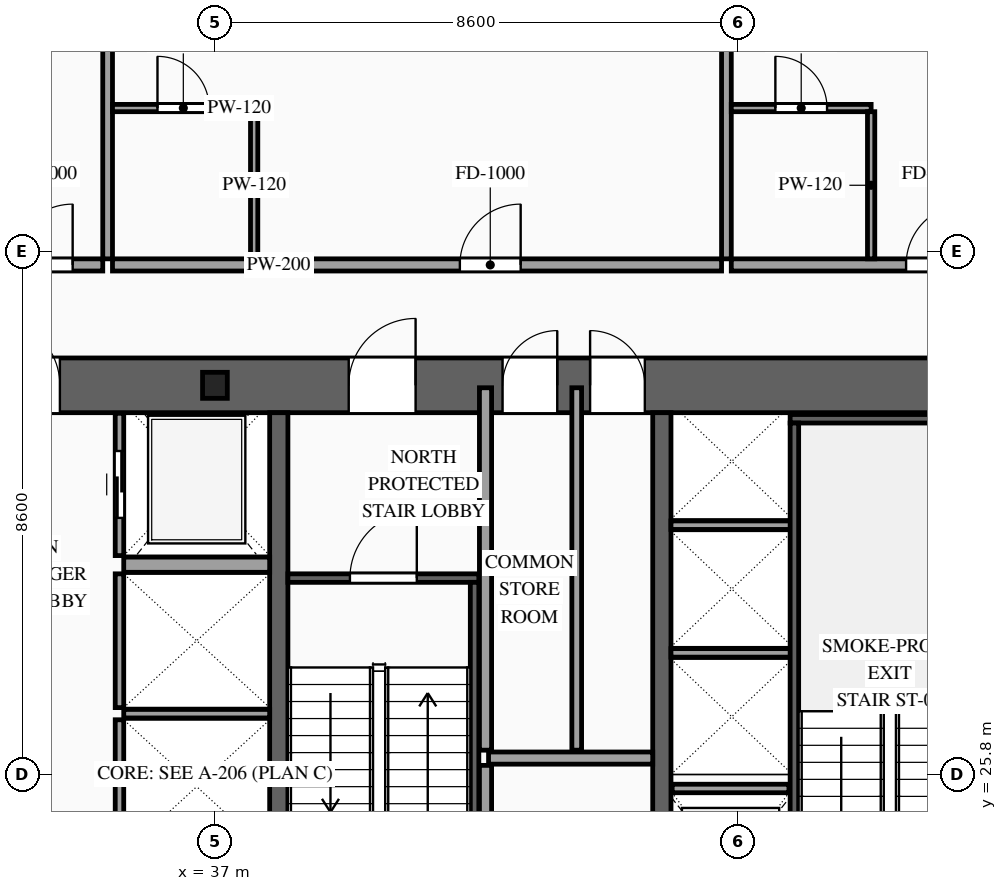
"""IFC4 building model, lengths in metres.
Left out: names, types, materials, properties, quantities, classifications, styles, units other than length and angle.
Written with IfcOpenShell. Run it as: python <this file> out.ifc"""

import sys

from ifc_helpers import new_model, si_unit, direction, frame, frame_2d, origin, origin_2d, place, context, subcontext, project, spatial, rectangle, i_section, extrude, source, transform, mapped, element, fill, save


model = new_model("IFC4")
c1 = context("Model", 3, precision=1e-05, world=origin(), true_north=direction((0.0, 1.0)))
c2 = subcontext(c1, "Body", "Model", "MODEL_VIEW")
j1 = project(units=[si_unit("LENGTHUNIT", "METRE"), si_unit("PLANEANGLEUNIT", "RADIAN")], contexts=[c1])
p1 = place(None, origin())
s1 = spatial("IfcSite", under=j1, at=p1, CompositionType="ELEMENT")
p2 = place(p1, origin())
s2 = spatial("IfcBuilding", under=s1, at=p2, CompositionType="ELEMENT")
p3 = place(p2, frame((0.0, 0.0, 74.8)))
s3 = spatial("IfcBuildingStorey", under=s2, at=p3, CompositionType="ELEMENT", Elevation=74.8)
p4 = place(p3, frame((23.35, 32.2, 0.0), z_axis=(0.0, 0.0, 1.0), x_axis=(1.0, 0.0, 0.0)))
e1 = element("IfcWall", 1, at=p4, inside=s3, PredefinedType="SHEAR", context=c2, shape_type="SweptSolid", body=[
    extrude(rectangle(XDim=27.3, YDim=0.9, at=frame_2d((13.65, 0.0))), origin(), (0.0, 0.0, 1.0), 3.6),
])
p5 = place(p4, frame((4.72, 0.0, 0.0)))
e2 = element("IfcOpeningElement", 2, at=p5, cuts=e1, PredefinedType="OPENING", context=c2, shape_type="SweptSolid", body=[
    extrude(rectangle(XDim=0.9, YDim=2.15, at=frame_2d((0.45, 1.075))), frame((0.0, 0.465, 0.0), z_axis=(0.0, -1.0, 0.0), x_axis=(1.0, 0.0, 0.0)), (0.0, 0.0, 1.0), 0.93),
])
p6 = place(p4, frame((10.0, 0.0, 0.0)))
e3 = element("IfcOpeningElement", 3, at=p6, cuts=e1, PredefinedType="OPENING", context=c2, shape_type="SweptSolid", body=[
    extrude(rectangle(XDim=1.1, YDim=2.2, at=frame_2d((0.55, 1.1))), frame((0.0, 0.465, 0.0), z_axis=(0.0, -1.0, 0.0), x_axis=(1.0, 0.0, 0.0)), (0.0, 0.0, 1.0), 0.93),
])
p7 = place(p4, frame((15.85, 0.0, 0.0)))
e4 = element("IfcOpeningElement", 4, at=p7, cuts=e1, PredefinedType="OPENING", context=c2, shape_type="SweptSolid", body=[
    extrude(rectangle(XDim=1.1, YDim=2.2, at=frame_2d((0.55, 1.1))), frame((0.0, 0.465, 0.0), z_axis=(0.0, -1.0, 0.0), x_axis=(1.0, 0.0, 0.0)), (0.0, 0.0, 1.0), 0.93),
])
p8 = place(p4, frame((18.38, 0.0, 0.0)))
e5 = element("IfcOpeningElement", 5, at=p8, cuts=e1, PredefinedType="OPENING", context=c2, shape_type="SweptSolid", body=[
    extrude(rectangle(XDim=0.9, YDim=2.15, at=frame_2d((0.45, 1.075))), frame((0.0, 0.465, 0.0), z_axis=(0.0, -1.0, 0.0), x_axis=(1.0, 0.0, 0.0)), (0.0, 0.0, 1.0), 0.93),
])
p9 = place(p4, frame((19.82, 0.0, 0.0)))
e6 = element("IfcOpeningElement", 6, at=p9, cuts=e1, PredefinedType="OPENING", context=c2, shape_type="SweptSolid", body=[
    extrude(rectangle(XDim=0.9, YDim=2.15, at=frame_2d((0.45, 1.075))), frame((0.0, 0.465, 0.0), z_axis=(0.0, -1.0, 0.0), x_axis=(1.0, 0.0, 0.0)), (0.0, 0.0, 1.0), 0.93),
])
m1 = source(origin(), c2, "Body", "SweptSolid", [
    extrude(rectangle(XDim=11.9, YDim=0.3, at=frame_2d((5.95, 0.0))), origin(), (0.0, 0.0, 1.0), 3.6),
])
for number, where, z_axis, x_axis in (
    (7, (38.05, 19.85, 0.0), (0.0, 0.0, 1.0), (0.0, 1.0, 0.0)),
    (8, (44.35, 19.85, 0.0), (0.0, 0.0, 1.0), (0.0, 1.0, 0.0)),
):
    element("IfcWall", number, at=place(p3, frame(where, z_axis=z_axis, x_axis=x_axis)), inside=s3, PredefinedType="SOLIDWALL", context=c2, shape_type="MappedRepresentation", body=[
        mapped(m1, transform((0.0, 0.0, 0.0), scale=1.0)),
    ])
m2 = source(origin(), c2, "Body", "SweptSolid", [
    extrude(i_section(OverallWidth=0.407, OverallDepth=0.428, WebThickness=0.02, FlangeThickness=0.035, at=origin_2d()), origin(), (0.0, 0.0, 1.0), 3.6),
])
p10 = place(p3, frame((37.0, 32.2, 0.0), z_axis=(0.0, 0.0, 1.0), x_axis=(1.0, 0.0, 0.0)))
e9 = element("IfcColumn", 9, at=p10, inside=s3, PredefinedType="COLUMN", context=c2, shape_type="MappedRepresentation", body=[
    mapped(m2, transform((0.0, 0.0, 0.0), scale=1.0)),
])
m3 = source(origin(), c2, "Body", "SweptSolid", [
    extrude(rectangle(XDim=1.92, YDim=0.14, at=frame_2d((0.96, 0.0))), origin(), (0.0, 0.0, 1.0), 3.38),
])
p11 = place(p3, frame((44.52, 25.57, 0.0), z_axis=(0.0, 0.0, 1.0), x_axis=(1.0, 0.0, 0.0)))
e10 = element("IfcWall", 10, at=p11, inside=s3, PredefinedType="SOLIDWALL", context=c2, shape_type="MappedRepresentation", body=[
    mapped(m3, transform((0.0, 0.0, 0.0), scale=1.0)),
])
m4 = source(origin(), c2, "Body", "SweptSolid", [
    extrude(rectangle(XDim=2.2, YDim=0.14, at=frame_2d((1.1, 0.0))), origin(), (0.0, 0.0, 1.0), 3.38),
])
p12 = place(p3, frame((35.43, 24.5, 0.0), z_axis=(0.0, 0.0, 1.0), x_axis=(0.0, 1.0, 0.0)))
e11 = element("IfcWall", 11, at=p12, inside=s3, PredefinedType="SOLIDWALL", context=c2, shape_type="MappedRepresentation", body=[
    mapped(m4, transform((0.0, 0.0, 0.0), scale=1.0)),
])
m5 = source(origin(), c2, "Body", "SweptSolid", [
    extrude(rectangle(XDim=2.4, YDim=0.14, at=frame_2d((1.2, 0.0))), origin(), (0.0, 0.0, 1.0), 3.38),
])
p13 = place(p3, frame((35.5, 26.8, 0.0), z_axis=(0.0, 0.0, 1.0), x_axis=(1.0, 0.0, 0.0)))
e12 = element("IfcWall", 12, at=p13, inside=s3, PredefinedType="SOLIDWALL", context=c2, shape_type="MappedRepresentation", body=[
    mapped(m5, transform((0.0, 0.0, 0.0), scale=1.0)),
])
m6 = source(origin(), c2, "Body", "SweptSolid", [
    extrude(rectangle(XDim=2.2, YDim=0.14, at=frame_2d((1.1, 0.0))), origin(), (0.0, 0.0, 1.0), 3.38),
])
p14 = place(p3, frame((35.43, 26.9, 0.0), z_axis=(0.0, 0.0, 1.0), x_axis=(0.0, 1.0, 0.0)))
e13 = element("IfcWall", 13, at=p14, inside=s3, PredefinedType="SOLIDWALL", context=c2, shape_type="MappedRepresentation", body=[
    mapped(m6, transform((0.0, 0.0, 0.0), scale=1.0)),
])
p15 = place(p3, frame((35.43, 29.4, 0.0), z_axis=(0.0, 0.0, 1.0), x_axis=(0.0, 1.0, 0.0)))
e14 = element("IfcWall", 14, at=p15, inside=s3, PredefinedType="SOLIDWALL", context=c2, shape_type="SweptSolid", body=[
    extrude(rectangle(XDim=2.34, YDim=0.14, at=frame_2d((1.17, 0.0))), origin(), (0.0, 0.0, 1.0), 3.38),
])
p16 = place(p15, frame((0.62, 0.0, 0.0)))
e15 = element("IfcOpeningElement", 15, at=p16, cuts=e14, PredefinedType="OPENING", context=c2, shape_type="SweptSolid", body=[
    extrude(rectangle(XDim=1.1, YDim=2.2, at=frame_2d((0.55, 1.1))), frame((0.0, 0.085, 0.0), z_axis=(0.0, -1.0, 0.0), x_axis=(1.0, 0.0, 0.0)), (0.0, 0.0, 1.0), 0.17),
])
m7 = source(origin(), c2, "Body", "SweptSolid", [
    extrude(rectangle(XDim=2.4, YDim=0.25, at=frame_2d((1.2, 0.0))), origin(), (0.0, 0.0, 1.0), 3.38),
])
p17 = place(p3, frame((35.5, 29.25, 0.0), z_axis=(0.0, 0.0, 1.0), x_axis=(1.0, 0.0, 0.0)))
e16 = element("IfcWall", 16, at=p17, inside=s3, PredefinedType="SOLIDWALL", context=c2, shape_type="MappedRepresentation", body=[
    mapped(m7, transform((0.0, 0.0, 0.0), scale=1.0)),
])
m8 = source(origin(), c2, "Body", "SweptSolid", [
    extrude(rectangle(XDim=2.0, YDim=0.14, at=frame_2d((1.0, 0.0))), origin(), (0.0, 0.0, 1.0), 3.38),
])
for number, where, z_axis, x_axis in (
    (17, (44.5, 27.8, 0.0), (0.0, 0.0, 1.0), (1.0, 0.0, 0.0)),
    (18, (44.5, 29.9, 0.0), (0.0, 0.0, 1.0), (1.0, 0.0, 0.0)),
):
    element("IfcWall", number, at=place(p3, frame(where, z_axis=z_axis, x_axis=x_axis)), inside=s3, PredefinedType="SOLIDWALL", context=c2, shape_type="MappedRepresentation", body=[
        mapped(m8, transform((0.0, 0.0, 0.0), scale=1.0)),
    ])
m9 = source(origin(), c2, "Body", "SweptSolid", [
    extrude(rectangle(XDim=3.28, YDim=0.14, at=frame_2d((1.64, 0.0))), origin(), (0.0, 0.0, 1.0), 3.38),
])
p18 = place(p3, frame((46.46, 31.65, 0.0), z_axis=(0.0, 0.0, 1.0), x_axis=(1.0, 0.0, 0.0)))
e19 = element("IfcWall", 19, at=p18, inside=s3, PredefinedType="SOLIDWALL", context=c2, shape_type="MappedRepresentation", body=[
    mapped(m9, transform((0.0, 0.0, 0.0), scale=1.0)),
])
m10 = source(origin(), c2, "Body", "SweptSolid", [
    extrude(rectangle(XDim=8.94, YDim=0.14, at=frame_2d((4.47, 0.0))), origin(), (0.0, 0.0, 1.0), 3.38),
])
p19 = place(p3, frame((46.53, 22.64, 0.0), z_axis=(0.0, 0.0, 1.0), x_axis=(0.0, 1.0, 0.0)))
e20 = element("IfcWall", 20, at=p19, inside=s3, PredefinedType="SOLIDWALL", context=c2, shape_type="MappedRepresentation", body=[
    mapped(m10, transform((0.0, 0.0, 0.0), scale=1.0)),
])
p20 = place(p3, frame((38.2, 29.03, 0.0), z_axis=(0.0, 0.0, 1.0), x_axis=(1.0, 0.0, 0.0)))
e21 = element("IfcWall", 21, at=p20, inside=s3, PredefinedType="SOLIDWALL", context=c2, shape_type="SweptSolid", body=[
    extrude(rectangle(XDim=3.14, YDim=0.14, at=frame_2d((1.57, 0.0))), origin(), (0.0, 0.0, 1.0), 3.38),
])
p21 = place(p20, frame((1.02, 0.0, 0.0)))
e22 = element("IfcOpeningElement", 22, at=p21, cuts=e21, PredefinedType="OPENING", context=c2, shape_type="SweptSolid", body=[
    extrude(rectangle(XDim=1.1, YDim=2.2, at=frame_2d((0.55, 1.1))), frame((0.0, 0.085, 0.0), z_axis=(0.0, -1.0, 0.0), x_axis=(1.0, 0.0, 0.0)), (0.0, 0.0, 1.0), 0.17),
])
m11 = source(origin(), c2, "Body", "SweptSolid", [
    extrude(rectangle(XDim=8.94, YDim=0.14, at=frame_2d((4.47, 0.0))), origin(), (0.0, 0.0, 1.0), 3.38),
])
p22 = place(p3, frame((41.27, 20.02, 0.0), z_axis=(0.0, 0.0, 1.0), x_axis=(0.0, 1.0, 0.0)))
e23 = element("IfcWall", 23, at=p22, inside=s3, PredefinedType="SOLIDWALL", context=c2, shape_type="MappedRepresentation", body=[
    mapped(m11, transform((0.0, 0.0, 0.0), scale=1.0)),
])
m12 = source(origin(), c2, "Body", "SweptSolid", [
    extrude(rectangle(XDim=6.51, YDim=0.2, at=frame_2d((3.255, 0.0))), origin(), (0.0, 0.0, 1.0), 3.38),
])
p23 = place(p3, frame((41.45, 19.44, 0.0), z_axis=(0.0, 0.0, 1.0), x_axis=(0.0, 1.0, 0.0)))
e24 = element("IfcWall", 24, at=p23, inside=s3, PredefinedType="PARTITIONING", context=c2, shape_type="MappedRepresentation", body=[
    mapped(m12, transform((0.0, 0.0, 0.0), scale=1.0)),
])
m13 = source(origin(), c2, "Body", "SweptSolid", [
    extrude(rectangle(XDim=2.7, YDim=0.2, at=frame_2d((1.35, 0.0))), origin(), (0.0, 0.0, 1.0), 3.38),
])
p24 = place(p3, frame((41.5, 26.07, 0.0), z_axis=(0.0, 0.0, 1.0), x_axis=(1.0, 0.0, 0.0)))
e25 = element("IfcWall", 25, at=p24, inside=s3, PredefinedType="PARTITIONING", context=c2, shape_type="MappedRepresentation", body=[
    mapped(m13, transform((0.0, 0.0, 0.0), scale=1.0)),
])
m14 = source(origin(), c2, "Body", "SweptSolid", [
    extrude(rectangle(XDim=5.96, YDim=0.2, at=frame_2d((2.98, 0.0))), origin(), (0.0, 0.0, 1.0), 3.38),
])
p25 = place(p3, frame((41.45, 26.2, 0.0), z_axis=(0.0, 0.0, 1.0), x_axis=(0.0, 1.0, 0.0)))
e26 = element("IfcWall", 26, at=p25, inside=s3, PredefinedType="PARTITIONING", context=c2, shape_type="MappedRepresentation", body=[
    mapped(m14, transform((0.0, 0.0, 0.0), scale=1.0)),
])
m15 = source(origin(), c2, "Body", "SweptSolid", [
    extrude(rectangle(XDim=5.96, YDim=0.16, at=frame_2d((2.98, 0.0))), origin(), (0.0, 0.0, 1.0), 3.38),
])
p26 = place(p3, frame((42.95, 26.2, 0.0), z_axis=(0.0, 0.0, 1.0), x_axis=(0.0, 1.0, 0.0)))
e27 = element("IfcWall", 27, at=p26, inside=s3, PredefinedType="PARTITIONING", context=c2, shape_type="MappedRepresentation", body=[
    mapped(m15, transform((0.0, 0.0, 0.0), scale=1.0)),
])
p27 = place(p3, frame((30.786, 34.18, 0.0), z_axis=(0.0, 0.0, 1.0), x_axis=(1.0, 0.0, 0.0)))
e28 = element("IfcWall", 28, at=p27, inside=s3, PredefinedType="PARTITIONING", context=c2, shape_type="SweptSolid", body=[
    extrude(rectangle(XDim=4.369, YDim=0.2, at=frame_2d((2.185, 0.0))), origin(), (0.0, 0.0, 1.0), 3.38),
])
p28 = place(p27, frame((2.874, 0.0, 0.0)))
e29 = element("IfcOpeningElement", 29, at=p28, cuts=e28, PredefinedType="OPENING", context=c2, shape_type="SweptSolid", body=[
    extrude(rectangle(XDim=1.0, YDim=2.2, at=frame_2d((0.5, 1.1))), frame((0.0, 0.115, 0.0), z_axis=(0.0, -1.0, 0.0), x_axis=(1.0, 0.0, 0.0)), (0.0, 0.0, 1.0), 0.23),
])
m16 = source(origin(), c2, "Body", "SweptSolid", [
    extrude(rectangle(XDim=16.47, YDim=0.16, at=frame_2d((8.235, 0.0))), origin(), (0.0, 0.0, 1.0), 3.38),
])
p29 = place(p3, frame((35.235, 34.28, 0.0), z_axis=(0.0, 0.0, 1.0), x_axis=(0.0, 1.0, 0.0)))
e30 = element("IfcWall", 30, at=p29, inside=s3, PredefinedType="PARTITIONING", context=c2, shape_type="MappedRepresentation", body=[
    mapped(m16, transform((0.0, 0.0, 0.0), scale=1.0)),
])
p30 = place(p3, frame((35.315, 34.18, 0.0), z_axis=(0.0, 0.0, 1.0), x_axis=(1.0, 0.0, 0.0)))
e31 = element("IfcWall", 31, at=p30, inside=s3, PredefinedType="PARTITIONING", context=c2, shape_type="SweptSolid", body=[
    extrude(rectangle(XDim=10.017, YDim=0.2, at=frame_2d((5.009, 0.0))), origin(), (0.0, 0.0, 1.0), 3.38),
])
p31 = place(p30, frame((5.713, 0.0, 0.0)))
e32 = element("IfcOpeningElement", 32, at=p31, cuts=e31, PredefinedType="OPENING", context=c2, shape_type="SweptSolid", body=[
    extrude(rectangle(XDim=1.0, YDim=2.2, at=frame_2d((0.5, 1.1))), frame((0.0, 0.115, 0.0), z_axis=(0.0, -1.0, 0.0), x_axis=(1.0, 0.0, 0.0)), (0.0, 0.0, 1.0), 0.23),
])
p32 = place(p3, frame((45.412, 34.28, 0.0), z_axis=(0.0, 0.0, 1.0), x_axis=(0.0, 1.0, 0.0)))
e33 = element("IfcWall", 33, at=p32, inside=s3, PredefinedType="PARTITIONING", context=c2, shape_type="MappedRepresentation", body=[
    mapped(m16, transform((0.0, 0.0, 0.0), scale=1.0)),
])
p33 = place(p3, frame((35.315, 36.76, 0.0), z_axis=(0.0, 0.0, 1.0), x_axis=(1.0, 0.0, 0.0)))
e34 = element("IfcWall", 34, at=p33, inside=s3, PredefinedType="PARTITIONING", context=c2, shape_type="SweptSolid", body=[
    extrude(rectangle(XDim=2.33, YDim=0.12, at=frame_2d((1.165, 0.0))), origin(), (0.0, 0.0, 1.0), 3.38),
])
p34 = place(p33, frame((0.74, 0.0, 0.0)))
e35 = element("IfcOpeningElement", 35, at=p34, cuts=e34, PredefinedType="OPENING", context=c2, shape_type="SweptSolid", body=[
    extrude(rectangle(XDim=0.85, YDim=2.1, at=frame_2d((0.425, 1.05))), frame((0.0, 0.075, 0.0), z_axis=(0.0, -1.0, 0.0), x_axis=(1.0, 0.0, 0.0)), (0.0, 0.0, 1.0), 0.15),
])
m17 = source(origin(), c2, "Body", "SweptSolid", [
    extrude(rectangle(XDim=2.42, YDim=0.12, at=frame_2d((1.21, 0.0))), origin(), (0.0, 0.0, 1.0), 3.38),
])
p35 = place(p3, frame((37.645, 34.28, 0.0), z_axis=(0.0, 0.0, 1.0), x_axis=(0.0, 1.0, 0.0)))
e36 = element("IfcWall", 36, at=p35, inside=s3, PredefinedType="PARTITIONING", context=c2, shape_type="MappedRepresentation", body=[
    mapped(m17, transform((0.0, 0.0, 0.0), scale=1.0)),
])
p36 = place(p3, frame((45.492, 34.18, 0.0), z_axis=(0.0, 0.0, 1.0), x_axis=(1.0, 0.0, 0.0)))
e37 = element("IfcWall", 37, at=p36, inside=s3, PredefinedType="PARTITIONING", context=c2, shape_type="SweptSolid", body=[
    extrude(rectangle(XDim=4.37, YDim=0.2, at=frame_2d((2.185, 0.0))), origin(), (0.0, 0.0, 1.0), 3.38),
])
p37 = place(p36, frame((2.875, 0.0, 0.0)))
e38 = element("IfcOpeningElement", 38, at=p37, cuts=e37, PredefinedType="OPENING", context=c2, shape_type="SweptSolid", body=[
    extrude(rectangle(XDim=1.0, YDim=2.2, at=frame_2d((0.5, 1.1))), frame((0.0, 0.115, 0.0), z_axis=(0.0, -1.0, 0.0), x_axis=(1.0, 0.0, 0.0)), (0.0, 0.0, 1.0), 0.23),
])
p38 = place(p3, frame((45.492, 36.76, 0.0), z_axis=(0.0, 0.0, 1.0), x_axis=(1.0, 0.0, 0.0)))
e39 = element("IfcWall", 39, at=p38, inside=s3, PredefinedType="PARTITIONING", context=c2, shape_type="SweptSolid", body=[
    extrude(rectangle(XDim=2.3, YDim=0.12, at=frame_2d((1.15, 0.0))), origin(), (0.0, 0.0, 1.0), 3.38),
])
p39 = place(p38, frame((0.725, 0.0, 0.0)))
e40 = element("IfcOpeningElement", 40, at=p39, cuts=e39, PredefinedType="OPENING", context=c2, shape_type="SweptSolid", body=[
    extrude(rectangle(XDim=0.85, YDim=2.1, at=frame_2d((0.425, 1.05))), frame((0.0, 0.075, 0.0), z_axis=(0.0, -1.0, 0.0), x_axis=(1.0, 0.0, 0.0)), (0.0, 0.0, 1.0), 0.15),
])
p40 = place(p3, frame((47.792, 34.28, 0.0), z_axis=(0.0, 0.0, 1.0), x_axis=(0.0, 1.0, 0.0)))
e41 = element("IfcWall", 41, at=p40, inside=s3, PredefinedType="PARTITIONING", context=c2, shape_type="MappedRepresentation", body=[
    mapped(m17, transform((0.0, 0.0, 0.0), scale=1.0)),
])
m18 = source(origin(), c2, "Body", "SweptSolid", [
    extrude(rectangle(XDim=1.1, YDim=2.2, at=frame_2d((0.55, 1.1))), frame((0.0, 0.025, 0.0), z_axis=(0.0, -1.0, 0.0), x_axis=(1.0, 0.0, 0.0)), (0.0, 0.0, 1.0), 0.05),
])
p41 = place(p16, origin())
e42 = element("IfcDoor", 42, at=p41, inside=s3, OperationType="SLIDING_TO_RIGHT", PredefinedType="DOOR", context=c2, shape_type="MappedRepresentation", body=[
    mapped(m18, transform((0.0, 0.0, 0.0), scale=1.0)),
])
fill(e15, e42)
m19 = source(origin(), c2, "Body", "SweptSolid", [
    extrude(rectangle(XDim=1.1, YDim=2.2, at=frame_2d((0.55, 1.1))), frame((0.0, 0.025, 0.0), z_axis=(0.0, -1.0, 0.0), x_axis=(1.0, 0.0, 0.0)), (0.0, 0.0, 1.0), 0.05),
])
p42 = place(p21, origin())
e43 = element("IfcDoor", 43, at=p42, inside=s3, OperationType="SINGLE_SWING_RIGHT", PredefinedType="DOOR", context=c2, shape_type="MappedRepresentation", body=[
    mapped(m19, transform((0.0, 0.0, 0.0), scale=1.0)),
])
fill(e22, e43)
p43 = place(p6, origin())
e44 = element("IfcDoor", 44, at=p43, inside=s3, OperationType="SINGLE_SWING_LEFT", PredefinedType="DOOR", context=c2, shape_type="MappedRepresentation", body=[
    mapped(m19, transform((0.0, 0.0, 0.0), scale=1.0)),
])
fill(e3, e44)
p44 = place(p7, origin())
e45 = element("IfcDoor", 45, at=p44, inside=s3, OperationType="SINGLE_SWING_RIGHT", PredefinedType="DOOR", context=c2, shape_type="MappedRepresentation", body=[
    mapped(m19, transform((0.0, 0.0, 0.0), scale=1.0)),
])
fill(e4, e45)
m20 = source(origin(), c2, "Body", "SweptSolid", [
    extrude(rectangle(XDim=0.9, YDim=2.15, at=frame_2d((0.45, 1.075))), frame((0.0, 0.025, 0.0), z_axis=(0.0, -1.0, 0.0), x_axis=(1.0, 0.0, 0.0)), (0.0, 0.0, 1.0), 0.05),
])
p45 = place(p8, origin())
e46 = element("IfcDoor", 46, at=p45, inside=s3, OperationType="SINGLE_SWING_RIGHT", PredefinedType="DOOR", context=c2, shape_type="MappedRepresentation", body=[
    mapped(m20, transform((0.0, 0.0, 0.0), scale=1.0)),
])
fill(e5, e46)
p46 = place(p9, origin())
e47 = element("IfcDoor", 47, at=p46, inside=s3, OperationType="SINGLE_SWING_LEFT", PredefinedType="DOOR", context=c2, shape_type="MappedRepresentation", body=[
    mapped(m20, transform((0.0, 0.0, 0.0), scale=1.0)),
])
fill(e6, e47)
m21 = source(origin(), c2, "Body", "SweptSolid", [
    extrude(rectangle(XDim=1.0, YDim=2.2, at=frame_2d((0.5, 1.1))), frame((0.0, 0.025, 0.0), z_axis=(0.0, -1.0, 0.0), x_axis=(1.0, 0.0, 0.0)), (0.0, 0.0, 1.0), 0.05),
])
p47 = place(p28, origin())
e48 = element("IfcDoor", 48, at=p47, inside=s3, OperationType="SINGLE_SWING_RIGHT", PredefinedType="DOOR", context=c2, shape_type="MappedRepresentation", body=[
    mapped(m21, transform((0.0, 0.0, 0.0), scale=1.0)),
])
fill(e29, e48)
p48 = place(p31, origin())
e49 = element("IfcDoor", 49, at=p48, inside=s3, OperationType="SINGLE_SWING_RIGHT", PredefinedType="DOOR", context=c2, shape_type="MappedRepresentation", body=[
    mapped(m21, transform((0.0, 0.0, 0.0), scale=1.0)),
])
fill(e32, e49)
m22 = source(origin(), c2, "Body", "SweptSolid", [
    extrude(rectangle(XDim=0.85, YDim=2.1, at=frame_2d((0.425, 1.05))), frame((0.0, 0.025, 0.0), z_axis=(0.0, -1.0, 0.0), x_axis=(1.0, 0.0, 0.0)), (0.0, 0.0, 1.0), 0.05),
])
p49 = place(p34, origin())
e50 = element("IfcDoor", 50, at=p49, inside=s3, OperationType="SINGLE_SWING_LEFT", PredefinedType="DOOR", context=c2, shape_type="MappedRepresentation", body=[
    mapped(m22, transform((0.0, 0.0, 0.0), scale=1.0)),
])
fill(e35, e50)
p50 = place(p37, origin())
e51 = element("IfcDoor", 51, at=p50, inside=s3, OperationType="SINGLE_SWING_RIGHT", PredefinedType="DOOR", context=c2, shape_type="MappedRepresentation", body=[
    mapped(m21, transform((0.0, 0.0, 0.0), scale=1.0)),
])
fill(e38, e51)
p51 = place(p39, origin())
e52 = element("IfcDoor", 52, at=p51, inside=s3, OperationType="SINGLE_SWING_LEFT", PredefinedType="DOOR", context=c2, shape_type="MappedRepresentation", body=[
    mapped(m22, transform((0.0, 0.0, 0.0), scale=1.0)),
])
fill(e40, e52)
save(model, sys.argv[1])
